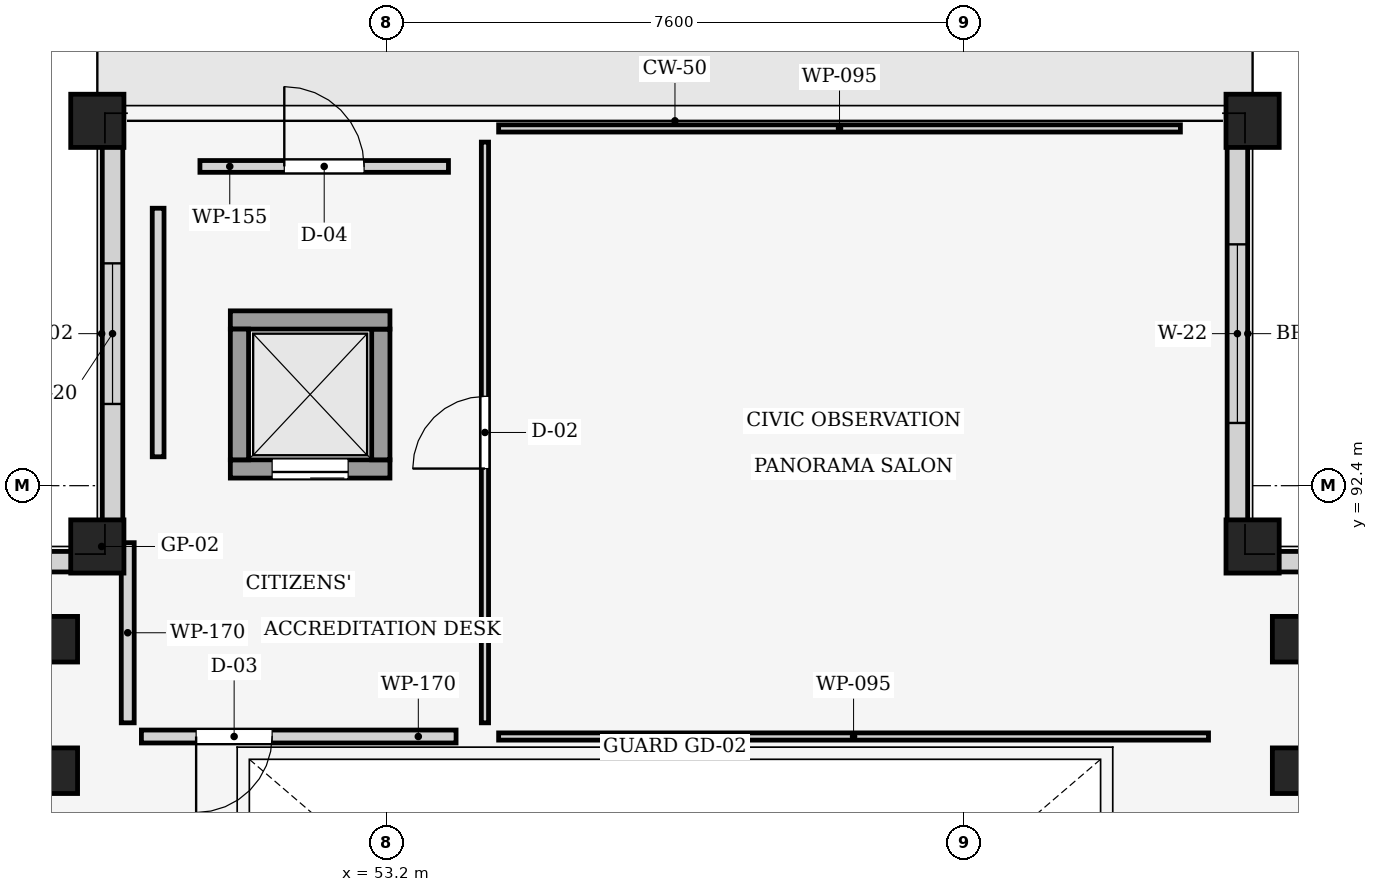
"""IFC4 building model, lengths in metres.
Left out: names, types, materials, properties, quantities, classifications, styles, units other than length and angle.
Written with IfcOpenShell. Run it as: python <this file> out.ifc"""

import sys

from ifc_helpers import new_model, si_unit, direction, frame, frame_2d, origin, origin_2d, place, context, subcontext, project, spatial, rectangle, extrude, element, fill, save


model = new_model("IFC4")
c1 = context("Model", 3, precision=1e-05, world=origin(), true_north=direction((0.0, 1.0)))
c2 = subcontext(c1, "Body", "Model", "MODEL_VIEW")
j1 = project(units=[si_unit("LENGTHUNIT", "METRE"), si_unit("PLANEANGLEUNIT", "RADIAN")], contexts=[c1])
p1 = place(None, origin())
s1 = spatial("IfcSite", under=j1, at=p1, CompositionType="ELEMENT")
p2 = place(p1, origin())
s2 = spatial("IfcBuilding", under=s1, at=p2, CompositionType="ELEMENT")
p3 = place(p2, frame((0.0, 0.0, 29.4)))
s3 = spatial("IfcBuildingStorey", under=s2, at=p3, CompositionType="ELEMENT", Elevation=29.4)
for number, where, z_axis, x_axis in (
    (1, (49.4, 91.6, 0.0), (0.0, 0.0, 1.0), (1.0, 0.0, 0.0)),
    (2, (49.4, 97.2, 0.0), (0.0, 0.0, 1.0), (1.0, 0.0, 0.0)),
    (3, (64.6, 91.6, 0.0), (0.0, 0.0, 1.0), (1.0, 0.0, 0.0)),
    (4, (64.6, 97.2, 0.0), (0.0, 0.0, 1.0), (1.0, 0.0, 0.0)),
):
    element("IfcColumn", number, at=place(p3, frame(where, z_axis=z_axis, x_axis=x_axis)), inside=s3, PredefinedType="COLUMN", context=c2, shape_type="SweptSolid", body=[
        extrude(rectangle(XDim=0.7, YDim=0.7, at=origin_2d()), origin(), (0.0, 0.0, 1.0), 5.0),
    ])
for number, where, z_axis, x_axis in (
    (5, (48.84, 88.65, 0.0), (0.0, 0.0, 1.0), (1.0, 0.0, 0.0)),
    (6, (48.84, 90.38, 0.0), (0.0, 0.0, 1.0), (1.0, 0.0, 0.0)),
    (7, (65.16, 88.65, 0.0), (0.0, 0.0, 1.0), (1.0, 0.0, 0.0)),
    (8, (65.16, 90.38, 0.0), (0.0, 0.0, 1.0), (1.0, 0.0, 0.0)),
):
    element("IfcColumn", number, at=place(p3, frame(where, z_axis=z_axis, x_axis=x_axis)), inside=s3, PredefinedType="COLUMN", context=c2, shape_type="SweptSolid", body=[
        extrude(rectangle(XDim=0.6, YDim=0.6, at=origin_2d()), origin(), (0.0, 0.0, 1.0), 4.75),
    ])
p4 = place(p3, frame((44.085, 91.4, 0.0), z_axis=(0.0, 0.0, 1.0), x_axis=(1.0, 0.0, 0.0)))
e9 = element("IfcWall", 9, at=p4, inside=s3, PredefinedType="STANDARD", context=c2, shape_type="SweptSolid", body=[
    extrude(rectangle(XDim=5.03, YDim=0.27, at=frame_2d((2.515, 0.0))), origin(), (0.0, 0.0, 1.0), 4.425),
])
p5 = place(p4, frame((1.715, 0.0, 0.85)))
e10 = element("IfcOpeningElement", 10, at=p5, cuts=e9, PredefinedType="OPENING", context=c2, shape_type="SweptSolid", body=[
    extrude(rectangle(XDim=1.6, YDim=1.65, at=frame_2d((0.8, 0.825))), frame((0.0, 0.145, 0.0), z_axis=(0.0, -1.0, 0.0), x_axis=(1.0, 0.0, 0.0)), (0.0, 0.0, 1.0), 0.29),
])
p6 = place(p3, frame((49.6, 91.885, 0.0), z_axis=(0.0, 0.0, 1.0), x_axis=(0.0, 1.0, 0.0)))
e11 = element("IfcWall", 11, at=p6, inside=s3, PredefinedType="STANDARD", context=c2, shape_type="SweptSolid", body=[
    extrude(rectangle(XDim=5.03, YDim=0.27, at=frame_2d((2.515, 0.0))), origin(), (0.0, 0.0, 1.0), 4.425),
])
p7 = place(p6, frame((1.59, 0.0, 0.85)))
e12 = element("IfcOpeningElement", 12, at=p7, cuts=e11, PredefinedType="OPENING", context=c2, shape_type="SweptSolid", body=[
    extrude(rectangle(XDim=1.85, YDim=1.65, at=frame_2d((0.925, 0.825))), frame((0.0, 0.145, 0.0), z_axis=(0.0, -1.0, 0.0), x_axis=(1.0, 0.0, 0.0)), (0.0, 0.0, 1.0), 0.29),
])
p8 = place(p3, frame((64.4, 96.915, 0.0), z_axis=(0.0, 0.0, 1.0), x_axis=(0.0, -1.0, 0.0)))
e13 = element("IfcWall", 13, at=p8, inside=s3, PredefinedType="STANDARD", context=c2, shape_type="SweptSolid", body=[
    extrude(rectangle(XDim=5.03, YDim=0.27, at=frame_2d((2.515, 0.0))), origin(), (0.0, 0.0, 1.0), 4.425),
])
p9 = place(p8, frame((1.34, 0.0, 0.85)))
e14 = element("IfcOpeningElement", 14, at=p9, cuts=e13, PredefinedType="OPENING", context=c2, shape_type="SweptSolid", body=[
    extrude(rectangle(XDim=2.35, YDim=1.65, at=frame_2d((1.175, 0.825))), frame((0.0, 0.145, 0.0), z_axis=(0.0, -1.0, 0.0), x_axis=(1.0, 0.0, 0.0)), (0.0, 0.0, 1.0), 0.29),
])
p10 = place(p3, frame((64.885, 91.4, 0.0), z_axis=(0.0, 0.0, 1.0), x_axis=(1.0, 0.0, 0.0)))
e15 = element("IfcWall", 15, at=p10, inside=s3, PredefinedType="STANDARD", context=c2, shape_type="SweptSolid", body=[
    extrude(rectangle(XDim=5.03, YDim=0.27, at=frame_2d((2.515, 0.0))), origin(), (0.0, 0.0, 1.0), 4.425),
])
p11 = place(p10, frame((1.215, 0.0, 0.85)))
e16 = element("IfcOpeningElement", 16, at=p11, cuts=e15, PredefinedType="OPENING", context=c2, shape_type="SweptSolid", body=[
    extrude(rectangle(XDim=2.6, YDim=1.65, at=frame_2d((1.3, 0.825))), frame((0.0, 0.145, 0.0), z_axis=(0.0, -1.0, 0.0), x_axis=(1.0, 0.0, 0.0)), (0.0, 0.0, 1.0), 0.29),
])
p12 = place(p3, frame((53.25, 92.62, 0.0), z_axis=(0.0, 0.0, 1.0), x_axis=(-1.0, 0.0, 0.0)))
e17 = element("IfcWall", 17, at=p12, inside=s3, PredefinedType="SHEAR", context=c2, shape_type="SweptSolid", body=[
    extrude(rectangle(XDim=2.1, YDim=0.24, at=frame_2d((1.05, 0.0))), origin(), (0.0, 0.0, 1.0), 4.75),
])
p13 = place(p12, frame((0.55, 0.0, 0.0)))
e18 = element("IfcOpeningElement", 18, at=p13, cuts=e17, PredefinedType="OPENING", context=c2, shape_type="SweptSolid", body=[
    extrude(rectangle(XDim=1.0, YDim=2.15, at=frame_2d((0.5, 1.075))), frame((0.0, 0.13, 0.0), z_axis=(0.0, -1.0, 0.0), x_axis=(1.0, 0.0, 0.0)), (0.0, 0.0, 1.0), 0.26),
])
p14 = place(p3, frame((53.13, 94.46, 0.0), z_axis=(0.0, 0.0, 1.0), x_axis=(0.0, -1.0, 0.0)))
e19 = element("IfcWall", 19, at=p14, inside=s3, PredefinedType="SHEAR", context=c2, shape_type="SweptSolid", body=[
    extrude(rectangle(XDim=1.72, YDim=0.24, at=frame_2d((0.86, 0.0))), origin(), (0.0, 0.0, 1.0), 4.75),
])
p15 = place(p3, frame((51.15, 94.58, 0.0), z_axis=(0.0, 0.0, 1.0), x_axis=(1.0, 0.0, 0.0)))
e20 = element("IfcWall", 20, at=p15, inside=s3, PredefinedType="SHEAR", context=c2, shape_type="SweptSolid", body=[
    extrude(rectangle(XDim=2.1, YDim=0.24, at=frame_2d((1.05, 0.0))), origin(), (0.0, 0.0, 1.0), 4.75),
])
p16 = place(p3, frame((51.27, 92.74, 0.0), z_axis=(0.0, 0.0, 1.0), x_axis=(0.0, 1.0, 0.0)))
e21 = element("IfcWall", 21, at=p16, inside=s3, PredefinedType="SHEAR", context=c2, shape_type="SweptSolid", body=[
    extrude(rectangle(XDim=1.72, YDim=0.24, at=frame_2d((0.86, 0.0))), origin(), (0.0, 0.0, 1.0), 4.75),
])
p17 = place(p3, frame((64.02, 89.1, 0.0), z_axis=(0.0, 0.0, 1.0), x_axis=(-1.0, 0.0, 0.0)))
e22 = element("IfcWall", 22, at=p17, inside=s3, PredefinedType="PARTITIONING", context=c2, shape_type="SweptSolid", body=[
    extrude(rectangle(XDim=9.34, YDim=0.095, at=frame_2d((4.67, 0.0))), origin(), (0.0, 0.0, 1.0), 4.57),
])
p18 = place(p3, frame((54.5, 89.28, 0.0), z_axis=(0.0, 0.0, 1.0), x_axis=(0.0, 1.0, 0.0)))
e23 = element("IfcWall", 23, at=p18, inside=s3, PredefinedType="PARTITIONING", context=c2, shape_type="SweptSolid", body=[
    extrude(rectangle(XDim=7.64, YDim=0.095, at=frame_2d((3.82, 0.0))), origin(), (0.0, 0.0, 1.0), 4.425),
])
p19 = place(p18, frame((3.345, 0.0, 0.0)))
e24 = element("IfcOpeningElement", 24, at=p19, cuts=e23, PredefinedType="OPENING", context=c2, shape_type="SweptSolid", body=[
    extrude(rectangle(XDim=0.95, YDim=2.1, at=frame_2d((0.475, 1.05))), frame((0.0, 0.057, 0.0), z_axis=(0.0, -1.0, 0.0), x_axis=(1.0, 0.0, 0.0)), (0.0, 0.0, 1.0), 0.115),
])
p20 = place(p3, frame((54.68, 97.1, 0.0), z_axis=(0.0, 0.0, 1.0), x_axis=(1.0, 0.0, 0.0)))
e25 = element("IfcWall", 25, at=p20, inside=s3, PredefinedType="PARTITIONING", context=c2, shape_type="SweptSolid", body=[
    extrude(rectangle(XDim=8.97, YDim=0.095, at=frame_2d((4.485, 0.0))), origin(), (0.0, 0.0, 1.0), 4.425),
])
p21 = place(p3, frame((54.12, 89.1, 0.0), z_axis=(0.0, 0.0, 1.0), x_axis=(-1.0, 0.0, 0.0)))
e26 = element("IfcWall", 26, at=p21, inside=s3, PredefinedType="PARTITIONING", context=c2, shape_type="SweptSolid", body=[
    extrude(rectangle(XDim=4.14, YDim=0.17, at=frame_2d((2.07, 0.0))), origin(), (0.0, 0.0, 1.0), 4.57),
])
p22 = place(p21, frame((2.42, 0.0, 0.0)))
e27 = element("IfcOpeningElement", 27, at=p22, cuts=e26, PredefinedType="OPENING", context=c2, shape_type="SweptSolid", body=[
    extrude(rectangle(XDim=1.0, YDim=2.1, at=frame_2d((0.5, 1.05))), frame((0.0, 0.095, 0.0), z_axis=(0.0, -1.0, 0.0), x_axis=(1.0, 0.0, 0.0)), (0.0, 0.0, 1.0), 0.19),
])
p23 = place(p3, frame((49.8, 89.28, 0.0), z_axis=(0.0, 0.0, 1.0), x_axis=(0.0, 1.0, 0.0)))
e28 = element("IfcWall", 28, at=p23, inside=s3, PredefinedType="PARTITIONING", context=c2, shape_type="SweptSolid", body=[
    extrude(rectangle(XDim=2.37, YDim=0.17, at=frame_2d((1.185, 0.0))), origin(), (0.0, 0.0, 1.0), 4.57),
])
p24 = place(p3, frame((50.2, 92.78, 0.0), z_axis=(0.0, 0.0, 1.0), x_axis=(0.0, 1.0, 0.0)))
e29 = element("IfcWall", 29, at=p24, inside=s3, PredefinedType="PARTITIONING", context=c2, shape_type="SweptSolid", body=[
    extrude(rectangle(XDim=3.27, YDim=0.155, at=frame_2d((1.635, 0.0))), origin(), (0.0, 0.0, 1.0), 4.57),
])
p25 = place(p3, frame((50.75, 96.6, 0.0), z_axis=(0.0, 0.0, 1.0), x_axis=(1.0, 0.0, 0.0)))
e30 = element("IfcWall", 30, at=p25, inside=s3, PredefinedType="PARTITIONING", context=c2, shape_type="SweptSolid", body=[
    extrude(rectangle(XDim=3.27, YDim=0.155, at=frame_2d((1.635, 0.0))), origin(), (0.0, 0.0, 1.0), 4.57),
])
p26 = place(p25, frame((1.11, 0.0, 0.0)))
e31 = element("IfcOpeningElement", 31, at=p26, cuts=e30, PredefinedType="OPENING", context=c2, shape_type="SweptSolid", body=[
    extrude(rectangle(XDim=1.05, YDim=2.1, at=frame_2d((0.525, 1.05))), frame((0.0, 0.087, 0.0), z_axis=(0.0, -1.0, 0.0), x_axis=(1.0, 0.0, 0.0)), (0.0, 0.0, 1.0), 0.175),
])
p27 = place(p7, origin())
e32 = element("IfcWindow", 32, at=p27, inside=s3, PartitioningType="SINGLE_PANEL", PredefinedType="WINDOW", context=c2, shape_type="SweptSolid", body=[
    extrude(rectangle(XDim=1.85, YDim=1.65, at=frame_2d((0.925, 0.825))), frame((0.0, 0.03, 0.0), z_axis=(0.0, -1.0, 0.0), x_axis=(1.0, 0.0, 0.0)), (0.0, 0.0, 1.0), 0.06),
])
fill(e12, e32)
p28 = place(p9, origin())
e33 = element("IfcWindow", 33, at=p28, inside=s3, PartitioningType="SINGLE_PANEL", PredefinedType="WINDOW", context=c2, shape_type="SweptSolid", body=[
    extrude(rectangle(XDim=2.35, YDim=1.65, at=frame_2d((1.175, 0.825))), frame((0.0, 0.03, 0.0), z_axis=(0.0, -1.0, 0.0), x_axis=(1.0, 0.0, 0.0)), (0.0, 0.0, 1.0), 0.06),
])
fill(e14, e33)
p29 = place(p13, origin())
e34 = element("IfcDoor", 34, at=p29, inside=s3, OperationType="SLIDING_TO_LEFT", PredefinedType="DOOR", context=c2, shape_type="SweptSolid", body=[
    extrude(rectangle(XDim=1.0, YDim=2.15, at=frame_2d((0.5, 1.075))), frame((0.0, 0.025, 0.0), z_axis=(0.0, -1.0, 0.0), x_axis=(1.0, 0.0, 0.0)), (0.0, 0.0, 1.0), 0.05),
])
fill(e18, e34)
p30 = place(p19, origin())
e35 = element("IfcDoor", 35, at=p30, inside=s3, OperationType="SINGLE_SWING_LEFT", PredefinedType="DOOR", context=c2, shape_type="SweptSolid", body=[
    extrude(rectangle(XDim=0.95, YDim=2.1, at=frame_2d((0.475, 1.05))), frame((0.0, 0.025, 0.0), z_axis=(0.0, -1.0, 0.0), x_axis=(1.0, 0.0, 0.0)), (0.0, 0.0, 1.0), 0.05),
])
fill(e24, e35)
p31 = place(p22, origin())
e36 = element("IfcDoor", 36, at=p31, inside=s3, OperationType="SINGLE_SWING_RIGHT", PredefinedType="DOOR", context=c2, shape_type="SweptSolid", body=[
    extrude(rectangle(XDim=1.0, YDim=2.1, at=frame_2d((0.5, 1.05))), frame((0.0, 0.025, 0.0), z_axis=(0.0, -1.0, 0.0), x_axis=(1.0, 0.0, 0.0)), (0.0, 0.0, 1.0), 0.05),
])
fill(e27, e36)
p32 = place(p26, origin())
e37 = element("IfcDoor", 37, at=p32, inside=s3, OperationType="SINGLE_SWING_LEFT", PredefinedType="DOOR", context=c2, shape_type="SweptSolid", body=[
    extrude(rectangle(XDim=1.05, YDim=2.1, at=frame_2d((0.525, 1.05))), frame((0.0, 0.025, 0.0), z_axis=(0.0, -1.0, 0.0), x_axis=(1.0, 0.0, 0.0)), (0.0, 0.0, 1.0), 0.05),
])
fill(e31, e37)
save(model, sys.argv[1])
